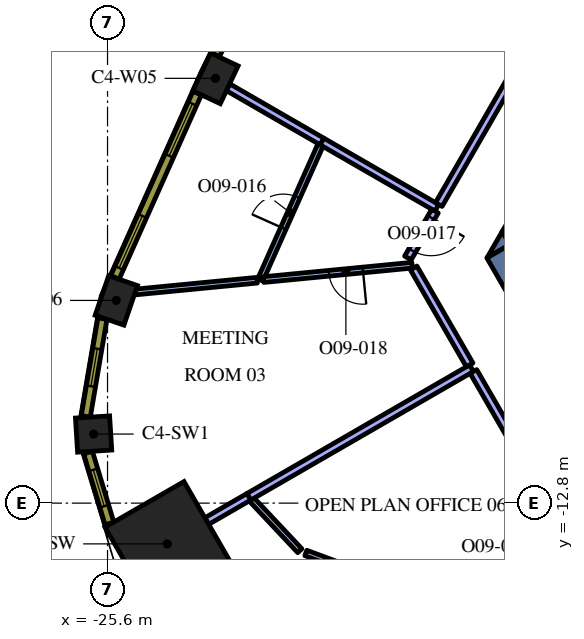
"""IFC4 building model, lengths in metres.
Left out: names, types, materials, properties, quantities, classifications, styles, units other than length and angle.
Written with IfcOpenShell. Run it as: python <this file> out.ifc"""

import sys

from ifc_helpers import new_model, si_unit, direction, frame, frame_2d, origin, origin_2d, place, context, subcontext, project, spatial, polyline, rectangle, outline, extrude, element, fill, save


model = new_model("IFC4")
c1 = context("Model", 3, precision=1e-05, world=origin(), true_north=direction((0.0, 1.0)))
c2 = subcontext(c1, "Body", "Model", "MODEL_VIEW")
j1 = project(units=[si_unit("LENGTHUNIT", "METRE"), si_unit("PLANEANGLEUNIT", "RADIAN")], contexts=[c1])
p1 = place(None, origin())
s1 = spatial("IfcSite", under=j1, at=p1, CompositionType="ELEMENT")
p2 = place(p1, origin())
s2 = spatial("IfcBuilding", under=s1, at=p2, CompositionType="ELEMENT")
p3 = place(p2, frame((0.0, 0.0, 247.8)))
s3 = spatial("IfcBuildingStorey", under=s2, at=p3, CompositionType="ELEMENT", Elevation=247.8)
p4 = place(p3, frame((-24.027, -13.872, 0.0), z_axis=(0.0, 0.0, 1.0), x_axis=(-0.866025403784, -0.5, 0.0)))
e1 = element("IfcColumn", 1, at=p4, inside=s3, PredefinedType="COLUMN", context=c2, shape_type="SweptSolid", body=[
    extrude(rectangle(XDim=2.4, YDim=2.4, at=origin_2d()), origin(), (0.0, 0.0, 1.0), 4.2),
])
for number, where, z_axis, x_axis in (
    (2, (-22.76, -1.623, 0.0), (0.0, 0.0, 1.0), (-0.426, -0.905, 0.0)),
    (3, (-25.369, -7.466, 0.0), (0.0, 0.0, 1.0), (-0.324, -0.946, 0.0)),
):
    element("IfcColumn", number, at=place(p3, frame(where, z_axis=z_axis, x_axis=x_axis)), inside=s3, PredefinedType="COLUMN", context=c2, shape_type="SweptSolid", body=[
        extrude(rectangle(XDim=1.1, YDim=0.8, at=origin_2d()), origin(), (0.0, 0.0, 1.0), 4.2),
    ])
p5 = place(p3, frame((-25.967, -10.982, 0.0), z_axis=(0.0, 0.0, 1.0), x_axis=(0.062217428964, -0.998062619044, 0.0)))
e4 = element("IfcColumn", 4, at=p5, inside=s3, PredefinedType="COLUMN", context=c2, shape_type="SweptSolid", body=[
    extrude(rectangle(XDim=0.9, YDim=0.9, at=origin_2d()), origin(), (0.0, 0.0, 1.0), 4.2),
])
p6 = place(p3, frame((-13.402, -9.487, 0.0), z_axis=(0.0, 0.0, 1.0), x_axis=(-0.500020498207, 0.866013568815, 0.0)))
e5 = element("IfcWall", 5, at=p6, inside=s3, PredefinedType="SOLIDWALL", context=c2, shape_type="SweptSolid", body=[
    extrude(rectangle(XDim=3.829, YDim=0.7, at=frame_2d((1.915, 0.0))), origin(), (0.0, 0.0, 1.0), 4.2),
])
p7 = place(p3, origin())
e6 = element("IfcWall", 6, at=p7, inside=s3, PredefinedType="SOLIDWALL", context=c2, shape_type="SweptSolid", body=[
    extrude(outline(polyline([(-15.014, -5.995), (-15.611, -6.339), (-15.213, -5.65), (-15.014, -5.995)])), origin(), (0.0, 0.0, 1.0), 4.2),
])
p8 = place(p3, frame((-13.475, -3.339, 0.0), z_axis=(0.0, 0.0, 1.0), x_axis=(-0.500008214683, -0.866020660983, 0.0)))
e7 = element("IfcWall", 7, at=p8, inside=s3, PredefinedType="SOLIDWALL", context=c2, shape_type="SweptSolid", body=[
    extrude(rectangle(XDim=2.884, YDim=0.7, at=frame_2d((1.442, 0.0))), origin(), (0.0, 0.0, 1.0), 4.2),
])
e8 = element("IfcWall", 8, at=p7, inside=s3, PredefinedType="SOLIDWALL", context=c2, shape_type="SweptSolid", body=[
    extrude(outline(polyline([(-14.809, -6.35), (-15.197, -5.678), (-14.615, -6.014), (-14.809, -6.35)])), origin(), (0.0, 0.0, 1.0), 4.2),
])
p9 = place(p3, frame((-19.951, -3.288, 0.0), z_axis=(0.0, 0.0, 1.0), x_axis=(-0.866044908516, 0.499966215292, 0.0)))
e9 = element("IfcWall", 9, at=p9, inside=s3, PredefinedType="PARTITIONING", context=c2, shape_type="SweptSolid", body=[
    extrude(rectangle(XDim=2.861, YDim=0.2, at=frame_2d((1.431, 0.0))), origin(), (0.0, 0.0, 1.0), 3.45),
])
p10 = place(p3, frame((-16.934, -5.03, 0.0), z_axis=(0.0, 0.0, 1.0), x_axis=(-0.866031916153, 0.499988720078, 0.0)))
e10 = element("IfcWall", 10, at=p10, inside=s3, PredefinedType="PARTITIONING", context=c2, shape_type="SweptSolid", body=[
    extrude(rectangle(XDim=3.492, YDim=0.2, at=frame_2d((1.746, 0.0))), origin(), (0.0, 0.0, 1.0), 3.45),
])
p11 = place(p3, frame((-14.037, -0.013, 0.0), z_axis=(0.0, 0.0, 1.0), x_axis=(-0.500018205831, -0.866014892388, 0.0)))
e11 = element("IfcWall", 11, at=p11, inside=s3, PredefinedType="PARTITIONING", context=c2, shape_type="SweptSolid", body=[
    extrude(rectangle(XDim=5.693, YDim=0.2, at=frame_2d((2.846, 0.0))), origin(), (0.0, 0.0, 1.0), 3.45),
])
p12 = place(p3, frame((-21.58, -6.927, 0.0), z_axis=(0.0, 0.0, 1.0), x_axis=(0.407612492408, 0.913155001099, 0.0)))
e12 = element("IfcWall", 12, at=p12, inside=s3, PredefinedType="PARTITIONING", context=c2, shape_type="SweptSolid", body=[
    extrude(rectangle(XDim=3.887, YDim=0.15, at=frame_2d((1.943, 0.0))), origin(), (0.0, 0.0, 1.0), 3.45),
])
p13 = place(p12, frame((1.487, 0.0, 0.0)))
e13 = element("IfcOpeningElement", 13, at=p13, cuts=e12, PredefinedType="OPENING", context=c2, shape_type="SweptSolid", body=[
    extrude(rectangle(XDim=0.9, YDim=2.1, at=frame_2d((0.45, 1.05))), frame((0.0, 0.085, 0.0), z_axis=(0.0, -1.0, 0.0), x_axis=(1.0, 0.0, 0.0)), (0.0, 0.0, 1.0), 0.17),
])
p14 = place(p3, frame((-21.666, -6.935, 0.0), z_axis=(0.0, 0.0, 1.0), x_axis=(-0.995359155707, -0.096229679155, 0.0)))
e14 = element("IfcWall", 14, at=p14, inside=s3, PredefinedType="PARTITIONING", context=c2, shape_type="SweptSolid", body=[
    extrude(rectangle(XDim=3.219, YDim=0.15, at=frame_2d((1.61, 0.0))), origin(), (0.0, 0.0, 1.0), 3.45),
])
p15 = place(p3, frame((-17.586, -6.54, 0.0), z_axis=(0.0, 0.0, 1.0), x_axis=(-0.995356357863, -0.096258614479, 0.0)))
e15 = element("IfcWall", 15, at=p15, inside=s3, PredefinedType="PARTITIONING", context=c2, shape_type="SweptSolid", body=[
    extrude(rectangle(XDim=3.926, YDim=0.15, at=frame_2d((1.963, 0.0))), origin(), (0.0, 0.0, 1.0), 3.45),
])
p16 = place(p15, frame((1.3, 0.0, 0.0)))
e16 = element("IfcOpeningElement", 16, at=p16, cuts=e15, PredefinedType="OPENING", context=c2, shape_type="SweptSolid", body=[
    extrude(rectangle(XDim=0.9, YDim=2.1, at=frame_2d((0.45, 1.05))), frame((0.0, 0.085, 0.0), z_axis=(0.0, -1.0, 0.0), x_axis=(1.0, 0.0, 0.0)), (0.0, 0.0, 1.0), 0.17),
])
p17 = place(p3, frame((-16.983, -5.116, 0.0), z_axis=(0.0, 0.0, 1.0), x_axis=(-0.500009219579, -0.866020080793, 0.0)))
e17 = element("IfcWall", 17, at=p17, inside=s3, PredefinedType="PARTITIONING", context=c2, shape_type="SweptSolid", body=[
    extrude(rectangle(XDim=1.425, YDim=0.2, at=frame_2d((0.712, 0.0))), origin(), (0.0, 0.0, 1.0), 3.45),
])
p18 = place(p17, frame((0.2, 0.0, 0.0)))
e18 = element("IfcOpeningElement", 18, at=p18, cuts=e17, PredefinedType="OPENING", context=c2, shape_type="SweptSolid", body=[
    extrude(rectangle(XDim=1.0, YDim=2.1, at=frame_2d((0.5, 1.05))), frame((0.0, 0.11, 0.0), z_axis=(0.0, -1.0, 0.0), x_axis=(1.0, 0.0, 0.0)), (0.0, 0.0, 1.0), 0.22),
])
p19 = place(p3, frame((-21.873, -12.628, 0.0), z_axis=(0.0, 0.0, 1.0), x_axis=(-0.866052988967, -0.499952218018, 0.0)))
e19 = element("IfcWall", 19, at=p19, inside=s3, PredefinedType="PARTITIONING", context=c2, shape_type="SweptSolid", body=[
    extrude(rectangle(XDim=1.288, YDim=0.2, at=frame_2d((0.644, 0.0))), origin(), (0.0, 0.0, 1.0), 3.45),
])
p20 = place(p3, frame((-16.021, -9.25, 0.0), z_axis=(0.0, 0.0, 1.0), x_axis=(-0.86602692059, -0.499997372806, 0.0)))
e20 = element("IfcWall", 20, at=p20, inside=s3, PredefinedType="PARTITIONING", context=c2, shape_type="SweptSolid", body=[
    extrude(rectangle(XDim=6.765, YDim=0.2, at=frame_2d((3.382, 0.0))), origin(), (0.0, 0.0, 1.0), 3.45),
])
p21 = place(p3, frame((-17.545, -6.612, 0.0), z_axis=(0.0, 0.0, 1.0), x_axis=(0.500006981563, -0.86602137294, 0.0)))
e21 = element("IfcWall", 21, at=p21, inside=s3, PredefinedType="PARTITIONING", context=c2, shape_type="SweptSolid", body=[
    extrude(rectangle(XDim=2.946, YDim=0.2, at=frame_2d((1.473, 0.0))), origin(), (0.0, 0.0, 1.0), 3.45),
])
p22 = place(p3, frame((-21.806, -12.705, 0.0), z_axis=(0.0, 0.0, 1.0), x_axis=(0.684700980092, -0.728824099396, 0.0)))
e22 = element("IfcWall", 22, at=p22, inside=s3, PredefinedType="PARTITIONING", context=c2, shape_type="SweptSolid", body=[
    extrude(rectangle(XDim=1.848, YDim=0.15, at=frame_2d((0.924, 0.0))), origin(), (0.0, 0.0, 1.0), 3.45),
])
p23 = place(p3, frame((-20.383, -14.111, 0.0), z_axis=(0.0, 0.0, 1.0), x_axis=(0.937598383102, -0.347720105838, 0.0)))
e23 = element("IfcWall", 23, at=p23, inside=s3, PredefinedType="PARTITIONING", context=c2, shape_type="SweptSolid", body=[
    extrude(rectangle(XDim=2.156, YDim=0.15, at=frame_2d((1.078, 0.0))), origin(), (0.0, 0.0, 1.0), 3.45),
])
p24 = place(p3, frame((-15.971, -9.337, 0.0), z_axis=(0.0, 0.0, 1.0), x_axis=(0.500010870188, -0.866019127788, 0.0)))
e24 = element("IfcWall", 24, at=p24, inside=s3, PredefinedType="PARTITIONING", context=c2, shape_type="SweptSolid", body=[
    extrude(rectangle(XDim=3.249, YDim=0.2, at=frame_2d((1.624, 0.0))), origin(), (0.0, 0.0, 1.0), 3.45),
])
p25 = place(p3, frame((-20.407, 3.74, 0.0), z_axis=(0.0, 0.0, 1.0), x_axis=(-0.445129582031, -0.895466166419, 0.0)))
e25 = element("IfcWall", 25, at=p25, inside=s3, PredefinedType="SOLIDWALL", context=c2, shape_type="SweptSolid", body=[
    extrude(rectangle(XDim=5.298, YDim=0.24, at=frame_2d((2.649, 0.0))), origin(), (0.0, 0.0, 1.0), 3.95),
])
p26 = place(p25, frame((0.295, 0.0, 0.9)))
e26 = element("IfcOpeningElement", 26, at=p26, cuts=e25, PredefinedType="OPENING", context=c2, shape_type="SweptSolid", body=[
    extrude(rectangle(XDim=1.5, YDim=2.55, at=frame_2d((0.75, 1.275))), frame((0.0, 0.13, 0.0), z_axis=(0.0, -1.0, 0.0), x_axis=(1.0, 0.0, 0.0)), (0.0, 0.0, 1.0), 0.26),
])
p27 = place(p25, frame((3.504, 0.0, 0.9)))
e27 = element("IfcOpeningElement", 27, at=p27, cuts=e25, PredefinedType="OPENING", context=c2, shape_type="SweptSolid", body=[
    extrude(rectangle(XDim=1.5, YDim=2.55, at=frame_2d((0.75, 1.275))), frame((0.0, 0.13, 0.0), z_axis=(0.0, -1.0, 0.0), x_axis=(1.0, 0.0, 0.0)), (0.0, 0.0, 1.0), 0.26),
])
p28 = place(p3, frame((-23.24, -2.011, 0.0), z_axis=(0.0, 0.0, 1.0), x_axis=(-0.407579651789, -0.913169659728, 0.0)))
e28 = element("IfcWall", 28, at=p28, inside=s3, PredefinedType="SOLIDWALL", context=c2, shape_type="SweptSolid", body=[
    extrude(rectangle(XDim=5.311, YDim=0.24, at=frame_2d((2.655, 0.0))), origin(), (0.0, 0.0, 1.0), 3.95),
])
p29 = place(p28, frame((0.306, 0.0, 0.9)))
e29 = element("IfcOpeningElement", 29, at=p29, cuts=e28, PredefinedType="OPENING", context=c2, shape_type="SweptSolid", body=[
    extrude(rectangle(XDim=1.5, YDim=2.55, at=frame_2d((0.75, 1.275))), frame((0.0, 0.13, 0.0), z_axis=(0.0, -1.0, 0.0), x_axis=(1.0, 0.0, 0.0)), (0.0, 0.0, 1.0), 0.26),
])
p30 = place(p28, frame((3.539, 0.0, 0.9)))
e30 = element("IfcOpeningElement", 30, at=p30, cuts=e28, PredefinedType="OPENING", context=c2, shape_type="SweptSolid", body=[
    extrude(rectangle(XDim=1.5, YDim=2.55, at=frame_2d((0.75, 1.275))), frame((0.0, 0.13, 0.0), z_axis=(0.0, -1.0, 0.0), x_axis=(1.0, 0.0, 0.0)), (0.0, 0.0, 1.0), 0.26),
])
p31 = place(p3, frame((-25.734, -7.945, 0.0), z_axis=(0.0, 0.0, 1.0), x_axis=(-0.167660055546, -0.985844869021, 0.0)))
e31 = element("IfcWall", 31, at=p31, inside=s3, PredefinedType="SOLIDWALL", context=c2, shape_type="SweptSolid", body=[
    extrude(rectangle(XDim=2.609, YDim=0.24, at=frame_2d((1.305, 0.0))), origin(), (0.0, 0.0, 1.0), 3.95),
])
p32 = place(p31, frame((0.805, 0.0, 0.9)))
e32 = element("IfcOpeningElement", 32, at=p32, cuts=e31, PredefinedType="OPENING", context=c2, shape_type="SweptSolid", body=[
    extrude(rectangle(XDim=1.0, YDim=2.55, at=frame_2d((0.5, 1.275))), frame((0.0, 0.13, 0.0), z_axis=(0.0, -1.0, 0.0), x_axis=(1.0, 0.0, 0.0)), (0.0, 0.0, 1.0), 0.26),
])
p33 = place(p3, frame((-26.112, -11.469, 0.0), z_axis=(0.0, 0.0, 1.0), x_axis=(0.288727209095, -0.957411405159, 0.0)))
e33 = element("IfcWall", 33, at=p33, inside=s3, PredefinedType="SOLIDWALL", context=c2, shape_type="SweptSolid", body=[
    extrude(rectangle(XDim=1.948, YDim=0.24, at=frame_2d((0.974, 0.0))), origin(), (0.0, 0.0, 1.0), 3.95),
])
p34 = place(p33, frame((0.474, 0.0, 0.9)))
e34 = element("IfcOpeningElement", 34, at=p34, cuts=e33, PredefinedType="OPENING", context=c2, shape_type="SweptSolid", body=[
    extrude(rectangle(XDim=1.0, YDim=2.55, at=frame_2d((0.5, 1.275))), frame((0.0, 0.13, 0.0), z_axis=(0.0, -1.0, 0.0), x_axis=(1.0, 0.0, 0.0)), (0.0, 0.0, 1.0), 0.26),
])
p35 = place(p13, origin())
e35 = element("IfcDoor", 35, at=p35, inside=s3, OperationType="SINGLE_SWING_LEFT", PredefinedType="DOOR", context=c2, shape_type="SweptSolid", body=[
    extrude(rectangle(XDim=0.9, YDim=2.1, at=frame_2d((0.45, 1.05))), frame((0.0, 0.025, 0.0), z_axis=(0.0, -1.0, 0.0), x_axis=(1.0, 0.0, 0.0)), (0.0, 0.0, 1.0), 0.05),
])
fill(e13, e35)
p36 = place(p18, origin())
e36 = element("IfcDoor", 36, at=p36, inside=s3, OperationType="SINGLE_SWING_LEFT", PredefinedType="DOOR", context=c2, shape_type="SweptSolid", body=[
    extrude(rectangle(XDim=1.0, YDim=2.1, at=frame_2d((0.5, 1.05))), frame((0.0, 0.025, 0.0), z_axis=(0.0, -1.0, 0.0), x_axis=(1.0, 0.0, 0.0)), (0.0, 0.0, 1.0), 0.05),
])
fill(e18, e36)
p37 = place(p16, origin())
e37 = element("IfcDoor", 37, at=p37, inside=s3, OperationType="SINGLE_SWING_LEFT", PredefinedType="DOOR", context=c2, shape_type="SweptSolid", body=[
    extrude(rectangle(XDim=0.9, YDim=2.1, at=frame_2d((0.45, 1.05))), frame((0.0, 0.025, 0.0), z_axis=(0.0, -1.0, 0.0), x_axis=(1.0, 0.0, 0.0)), (0.0, 0.0, 1.0), 0.05),
])
fill(e16, e37)
p38 = place(p29, origin())
e38 = element("IfcWindow", 38, at=p38, inside=s3, PartitioningType="SINGLE_PANEL", PredefinedType="WINDOW", context=c2, shape_type="SweptSolid", body=[
    extrude(rectangle(XDim=1.5, YDim=2.55, at=frame_2d((0.75, 1.275))), frame((0.0, 0.04, 0.0), z_axis=(0.0, -1.0, 0.0), x_axis=(1.0, 0.0, 0.0)), (0.0, 0.0, 1.0), 0.06),
])
fill(e29, e38)
p39 = place(p30, origin())
e39 = element("IfcWindow", 39, at=p39, inside=s3, PartitioningType="SINGLE_PANEL", PredefinedType="WINDOW", context=c2, shape_type="SweptSolid", body=[
    extrude(rectangle(XDim=1.5, YDim=2.55, at=frame_2d((0.75, 1.275))), frame((0.0, 0.04, 0.0), z_axis=(0.0, -1.0, 0.0), x_axis=(1.0, 0.0, 0.0)), (0.0, 0.0, 1.0), 0.06),
])
fill(e30, e39)
p40 = place(p32, origin())
e40 = element("IfcWindow", 40, at=p40, inside=s3, PartitioningType="SINGLE_PANEL", PredefinedType="WINDOW", context=c2, shape_type="SweptSolid", body=[
    extrude(rectangle(XDim=1.0, YDim=2.55, at=frame_2d((0.5, 1.275))), frame((0.0, 0.04, 0.0), z_axis=(0.0, -1.0, 0.0), x_axis=(1.0, 0.0, 0.0)), (0.0, 0.0, 1.0), 0.06),
])
fill(e32, e40)
p41 = place(p34, origin())
e41 = element("IfcWindow", 41, at=p41, inside=s3, PartitioningType="SINGLE_PANEL", PredefinedType="WINDOW", context=c2, shape_type="SweptSolid", body=[
    extrude(rectangle(XDim=1.0, YDim=2.55, at=frame_2d((0.5, 1.275))), frame((0.0, 0.04, 0.0), z_axis=(0.0, -1.0, 0.0), x_axis=(1.0, 0.0, 0.0)), (0.0, 0.0, 1.0), 0.06),
])
fill(e34, e41)
save(model, sys.argv[1])
